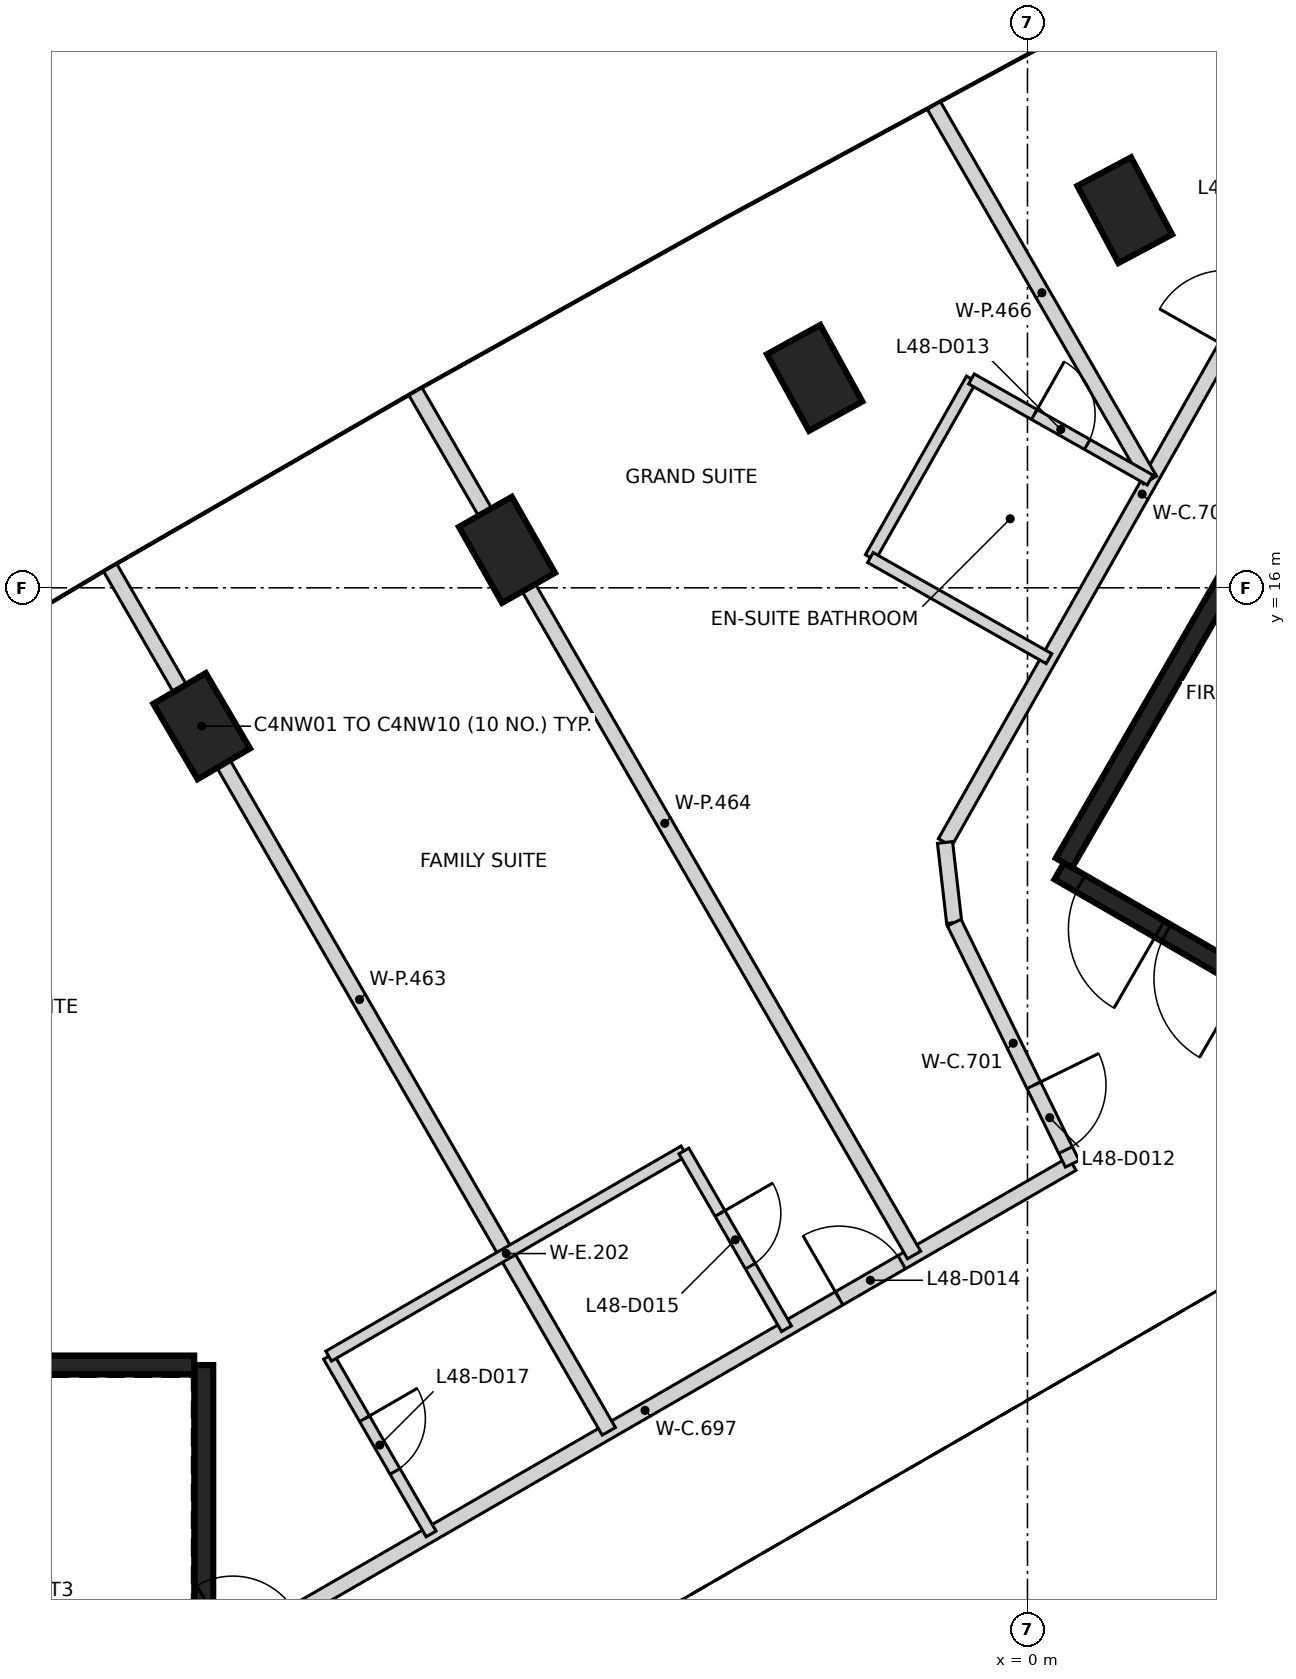
"""IFC4 building model, lengths in metres.
Left out: names, types, materials, properties, quantities, classifications, styles, units other than length and angle.
Written with IfcOpenShell. Run it as: python <this file> out.ifc"""

import sys

from ifc_helpers import new_model, si_unit, direction, frame, frame_2d, origin, origin_2d, place, context, subcontext, project, spatial, rectangle, extrude, element, fill, save


model = new_model("IFC4")
c1 = context("Model", 3, precision=1e-05, world=origin(), true_north=direction((0.0, 1.0)))
c2 = subcontext(c1, "Body", "Model", "MODEL_VIEW")
j1 = project(units=[si_unit("LENGTHUNIT", "METRE"), si_unit("PLANEANGLEUNIT", "RADIAN")], contexts=[c1])
p1 = place(None, origin())
s1 = spatial("IfcSite", under=j1, at=p1, CompositionType="ELEMENT")
p2 = place(p1, origin())
s2 = spatial("IfcBuilding", under=s1, at=p2, CompositionType="ELEMENT")
p3 = place(p2, frame((0.0, 0.0, 193.6)))
s3 = spatial("IfcBuildingStorey", under=s2, at=p3, CompositionType="ELEMENT", Elevation=193.6)
for number, where, z_axis, x_axis in (
    (1, (1.279, 20.968, -0.35), (0.0, 0.0, 1.0), (-0.47, 0.883, 0.0)),
    (2, (-2.8, 18.762, -0.35), (0.0, 0.0, 1.0), (-0.482, 0.876, 0.0)),
    (3, (-6.848, 16.499, -0.35), (0.0, 0.0, 1.0), (-0.494, 0.87, 0.0)),
    (4, (-10.864, 14.18, -0.35), (0.0, 0.0, 1.0), (-0.506, 0.862, 0.0)),
):
    element("IfcColumn", number, at=place(p3, frame(where, z_axis=z_axis, x_axis=x_axis)), inside=s3, PredefinedType="COLUMN", context=c2, shape_type="SweptSolid", body=[
        extrude(rectangle(XDim=1.15, YDim=0.8, at=origin_2d()), origin(), (0.0, 0.0, 1.0), 3.6),
    ])
p4 = place(p3, frame((-10.837, 5.775, 0.0), z_axis=(0.0, 0.0, 1.0), x_axis=(0.0, -1.0, 0.0)))
e5 = element("IfcWall", 5, at=p4, inside=s3, PredefinedType="SHEAR", context=c2, shape_type="SweptSolid", body=[
    extrude(rectangle(XDim=11.55, YDim=0.25, at=frame_2d((5.775, 0.0))), origin(), (0.0, 0.0, 1.0), 3.25),
])
p5 = place(p4, frame((10.025, 0.0, 0.0)))
e6 = element("IfcOpeningElement", 6, at=p5, cuts=e5, PredefinedType="OPENING", context=c2, shape_type="SweptSolid", body=[
    extrude(rectangle(XDim=1.2, YDim=2.1, at=frame_2d((0.6, 1.05))), frame((0.0, 0.135, 0.0), z_axis=(0.0, -1.0, 0.0), x_axis=(1.0, 0.0, 0.0)), (0.0, 0.0, 1.0), 0.27),
])
p6 = place(p4, frame((8.725, 0.0, 0.0)))
e7 = element("IfcOpeningElement", 7, at=p6, cuts=e5, PredefinedType="OPENING", context=c2, shape_type="SweptSolid", body=[
    extrude(rectangle(XDim=1.2, YDim=2.1, at=frame_2d((0.6, 1.05))), frame((0.0, 0.135, 0.0), z_axis=(0.0, -1.0, 0.0), x_axis=(1.0, 0.0, 0.0)), (0.0, 0.0, 1.0), 0.27),
])
p7 = place(p3, frame((-16.472, 5.775, 0.0), z_axis=(0.0, 0.0, 1.0), x_axis=(1.0, 0.0, 0.0)))
e8 = element("IfcWall", 8, at=p7, inside=s3, PredefinedType="SHEAR", context=c2, shape_type="SweptSolid", body=[
    extrude(rectangle(XDim=5.51, YDim=0.25, at=frame_2d((2.755, 0.0))), origin(), (0.0, 0.0, 1.0), 3.25),
])
p8 = place(p3, frame((10.42, 6.498, 0.0), z_axis=(0.0, 0.0, 1.0), x_axis=(-0.866021906294, 0.500006057782, 0.0)))
e9 = element("IfcWall", 9, at=p8, inside=s3, PredefinedType="SHEAR", context=c2, shape_type="SweptSolid", body=[
    extrude(rectangle(XDim=11.55, YDim=0.25, at=frame_2d((5.775, 0.0))), origin(), (0.0, 0.0, 1.0), 3.25),
])
p9 = place(p8, frame((10.025, 0.0, 0.0)))
e10 = element("IfcOpeningElement", 10, at=p9, cuts=e9, PredefinedType="OPENING", context=c2, shape_type="SweptSolid", body=[
    extrude(rectangle(XDim=1.2, YDim=2.1, at=frame_2d((0.6, 1.05))), frame((0.0, 0.135, 0.0), z_axis=(0.0, -1.0, 0.0), x_axis=(1.0, 0.0, 0.0)), (0.0, 0.0, 1.0), 0.27),
])
p10 = place(p8, frame((8.725, 0.0, 0.0)))
e11 = element("IfcOpeningElement", 11, at=p10, cuts=e9, PredefinedType="OPENING", context=c2, shape_type="SweptSolid", body=[
    extrude(rectangle(XDim=1.2, YDim=2.1, at=frame_2d((0.6, 1.05))), frame((0.0, 0.135, 0.0), z_axis=(0.0, -1.0, 0.0), x_axis=(1.0, 0.0, 0.0)), (0.0, 0.0, 1.0), 0.27),
])
p11 = place(p3, frame((0.48, 12.381, 0.0), z_axis=(0.0, 0.0, 1.0), x_axis=(0.49999885962, 0.866026062182, 0.0)))
e12 = element("IfcWall", 12, at=p11, inside=s3, PredefinedType="SHEAR", context=c2, shape_type="SweptSolid", body=[
    extrude(rectangle(XDim=5.225, YDim=0.25, at=frame_2d((2.612, 0.0))), origin(), (0.0, 0.0, 1.0), 3.25),
])
p12 = place(p3, frame((-10.652, 1.934, 0.0), z_axis=(0.0, 0.0, 1.0), x_axis=(0.866066882415, 0.499928150021, 0.0)))
e13 = element("IfcWall", 13, at=p12, inside=s3, PredefinedType="PARTITIONING", context=c2, shape_type="SweptSolid", body=[
    extrude(rectangle(XDim=12.98, YDim=0.2, at=frame_2d((6.49, 0.0))), origin(), (0.0, 0.0, 1.0), 3.25),
])
p13 = place(p12, frame((9.439, 0.0, 0.0)))
e14 = element("IfcOpeningElement", 14, at=p13, cuts=e13, PredefinedType="OPENING", context=c2, shape_type="SweptSolid", body=[
    extrude(rectangle(XDim=0.95, YDim=2.1, at=frame_2d((0.475, 1.05))), frame((0.0, 0.11, 0.0), z_axis=(0.0, -1.0, 0.0), x_axis=(1.0, 0.0, 0.0)), (0.0, 0.0, 1.0), 0.22),
])
p14 = place(p12, frame((0.229, 0.0, 0.0)))
e15 = element("IfcOpeningElement", 15, at=p14, cuts=e13, PredefinedType="OPENING", context=c2, shape_type="SweptSolid", body=[
    extrude(rectangle(XDim=0.95, YDim=2.1, at=frame_2d((0.475, 1.05))), frame((0.0, 0.11, 0.0), z_axis=(0.0, -1.0, 0.0), x_axis=(1.0, 0.0, 0.0)), (0.0, 0.0, 1.0), 0.22),
])
p15 = place(p3, frame((-1.085, 12.65, 0.0), z_axis=(0.0, 0.0, 1.0), x_axis=(0.49243456751, 0.870349468157, 0.0)))
e16 = element("IfcWall", 16, at=p15, inside=s3, PredefinedType="PARTITIONING", context=c2, shape_type="SweptSolid", body=[
    extrude(rectangle(XDim=10.531, YDim=0.2, at=frame_2d((5.266, 0.0))), origin(), (0.0, 0.0, 1.0), 3.25),
])
p16 = place(p15, frame((7.499, 0.0, 0.0)))
e17 = element("IfcOpeningElement", 17, at=p16, cuts=e16, PredefinedType="OPENING", context=c2, shape_type="SweptSolid", body=[
    extrude(rectangle(XDim=1.0, YDim=2.1, at=frame_2d((0.5, 1.05))), frame((0.0, 0.11, 0.0), z_axis=(0.0, -1.0, 0.0), x_axis=(1.0, 0.0, 0.0)), (0.0, 0.0, 1.0), 0.22),
])
p17 = place(p3, frame((-1.085, 12.65, 0.0), z_axis=(0.0, 0.0, 1.0), x_axis=(0.113812454263, -0.993502252264, 0.0)))
e18 = element("IfcWall", 18, at=p17, inside=s3, PredefinedType="PARTITIONING", context=c2, shape_type="SweptSolid", body=[
    extrude(rectangle(XDim=1.062, YDim=0.2, at=frame_2d((0.531, 0.0))), origin(), (0.0, 0.0, 1.0), 3.25),
])
p18 = place(p3, frame((-0.964, 11.595, 0.0), z_axis=(0.0, 0.0, 1.0), x_axis=(0.439787800928, -0.898101714816, 0.0)))
e19 = element("IfcWall", 19, at=p18, inside=s3, PredefinedType="PARTITIONING", context=c2, shape_type="SweptSolid", body=[
    extrude(rectangle(XDim=3.532, YDim=0.2, at=frame_2d((1.766, 0.0))), origin(), (0.0, 0.0, 1.0), 3.25),
])
p19 = place(p18, frame((2.382, 0.0, 0.0)))
e20 = element("IfcOpeningElement", 20, at=p19, cuts=e19, PredefinedType="OPENING", context=c2, shape_type="SweptSolid", body=[
    extrude(rectangle(XDim=0.95, YDim=2.1, at=frame_2d((0.475, 1.05))), frame((0.0, 0.11, 0.0), z_axis=(0.0, -1.0, 0.0), x_axis=(1.0, 0.0, 0.0)), (0.0, 0.0, 1.0), 0.22),
])
p20 = place(p3, frame((-12.067, 16.263, 0.0), z_axis=(0.0, 0.0, 1.0), x_axis=(0.500016190239, -0.866016056144, 0.0)))
e21 = element("IfcWall", 21, at=p20, inside=s3, PredefinedType="PARTITIONING", context=c2, shape_type="SweptSolid", body=[
    extrude(rectangle(XDim=13.118, YDim=0.2, at=frame_2d((6.559, 0.0))), origin(), (0.0, 0.0, 1.0), 3.25),
])
p21 = place(p3, frame((-8.052, 18.582, 0.0), z_axis=(0.0, 0.0, 1.0), x_axis=(0.500046266189, -0.86599869034, 0.0)))
e22 = element("IfcWall", 22, at=p21, inside=s3, PredefinedType="PARTITIONING", context=c2, shape_type="SweptSolid", body=[
    extrude(rectangle(XDim=13.118, YDim=0.2, at=frame_2d((6.559, 0.0))), origin(), (0.0, 0.0, 1.0), 3.25),
])
p22 = place(p3, frame((-1.232, 22.345, 0.0), z_axis=(0.0, 0.0, 1.0), x_axis=(0.499942901263, -0.866058367246, 0.0)))
e23 = element("IfcWall", 23, at=p22, inside=s3, PredefinedType="PARTITIONING", context=c2, shape_type="SweptSolid", body=[
    extrude(rectangle(XDim=5.688, YDim=0.2, at=frame_2d((2.844, 0.0))), origin(), (0.0, 0.0, 1.0), 2.35),
])
p23 = place(p3, frame((-9.195, 5.889, 0.0), z_axis=(0.0, 0.0, 1.0), x_axis=(0.500129820725, -0.865950438779, 0.0)))
e24 = element("IfcWall", 24, at=p23, inside=s3, PredefinedType="PARTITIONING", context=c2, shape_type="SweptSolid", body=[
    extrude(rectangle(XDim=2.698, YDim=0.15, at=frame_2d((1.349, 0.0))), origin(), (0.0, 0.0, 1.0), 3.25),
])
p24 = place(p23, frame((0.948, 0.0, 0.0)))
e25 = element("IfcOpeningElement", 25, at=p24, cuts=e24, PredefinedType="OPENING", context=c2, shape_type="SweptSolid", body=[
    extrude(rectangle(XDim=0.8, YDim=2.1, at=frame_2d((0.4, 1.05))), frame((0.0, 0.085, 0.0), z_axis=(0.0, -1.0, 0.0), x_axis=(1.0, 0.0, 0.0)), (0.0, 0.0, 1.0), 0.17),
])
p25 = place(p3, frame((-9.194, 5.892, 0.0), z_axis=(0.0, 0.0, 1.0), x_axis=(0.8659934935, 0.500055266161, 0.0)))
e26 = element("IfcWall", 26, at=p25, inside=s3, PredefinedType="PARTITIONING", context=c2, shape_type="SweptSolid", body=[
    extrude(rectangle(XDim=5.397, YDim=0.15, at=frame_2d((2.699, 0.0))), origin(), (0.0, 0.0, 1.0), 3.25),
])
p26 = place(p3, frame((-4.52, 8.591, 0.0), z_axis=(0.0, 0.0, 1.0), x_axis=(0.500048589285, -0.86599734893, 0.0)))
e27 = element("IfcWall", 27, at=p26, inside=s3, PredefinedType="PARTITIONING", context=c2, shape_type="SweptSolid", body=[
    extrude(rectangle(XDim=2.7, YDim=0.15, at=frame_2d((1.35, 0.0))), origin(), (0.0, 0.0, 1.0), 3.25),
])
p27 = place(p26, frame((0.95, 0.0, 0.0)))
e28 = element("IfcOpeningElement", 28, at=p27, cuts=e27, PredefinedType="OPENING", context=c2, shape_type="SweptSolid", body=[
    extrude(rectangle(XDim=0.8, YDim=2.1, at=frame_2d((0.4, 1.05))), frame((0.0, 0.085, 0.0), z_axis=(0.0, -1.0, 0.0), x_axis=(1.0, 0.0, 0.0)), (0.0, 0.0, 1.0), 0.17),
])
p28 = place(p3, frame((-2.067, 16.398, 0.0), z_axis=(0.0, 0.0, 1.0), x_axis=(0.492483230042, 0.870321933613, 0.0)))
e29 = element("IfcWall", 29, at=p28, inside=s3, PredefinedType="PARTITIONING", context=c2, shape_type="SweptSolid", body=[
    extrude(rectangle(XDim=2.7, YDim=0.15, at=frame_2d((1.35, 0.0))), origin(), (0.0, 0.0, 1.0), 3.25),
])
p29 = place(p3, frame((-2.067, 16.398, 0.0), z_axis=(0.0, 0.0, 1.0), x_axis=(0.870300002118, -0.492521985614, 0.0)))
e30 = element("IfcWall", 30, at=p29, inside=s3, PredefinedType="PARTITIONING", context=c2, shape_type="SweptSolid", body=[
    extrude(rectangle(XDim=2.7, YDim=0.15, at=frame_2d((1.35, 0.0))), origin(), (0.0, 0.0, 1.0), 3.25),
])
p30 = place(p3, frame((-0.737, 18.748, 0.0), z_axis=(0.0, 0.0, 1.0), x_axis=(0.870283179633, -0.492551710227, 0.0)))
e31 = element("IfcWall", 31, at=p30, inside=s3, PredefinedType="PARTITIONING", context=c2, shape_type="SweptSolid", body=[
    extrude(rectangle(XDim=2.7, YDim=0.15, at=frame_2d((1.35, 0.0))), origin(), (0.0, 0.0, 1.0), 3.25),
])
p31 = place(p30, frame((0.95, 0.0, 0.0)))
e32 = element("IfcOpeningElement", 32, at=p31, cuts=e31, PredefinedType="OPENING", context=c2, shape_type="SweptSolid", body=[
    extrude(rectangle(XDim=0.8, YDim=2.1, at=frame_2d((0.4, 1.05))), frame((0.0, 0.085, 0.0), z_axis=(0.0, -1.0, 0.0), x_axis=(1.0, 0.0, 0.0)), (0.0, 0.0, 1.0), 0.17),
])
p32 = place(p9, origin())
e33 = element("IfcDoor", 33, at=p32, inside=s3, OperationType="SINGLE_SWING_LEFT", PredefinedType="DOOR", context=c2, shape_type="SweptSolid", body=[
    extrude(rectangle(XDim=1.2, YDim=2.1, at=frame_2d((0.6, 1.05))), frame((0.0, 0.025, 0.0), z_axis=(0.0, -1.0, 0.0), x_axis=(1.0, 0.0, 0.0)), (0.0, 0.0, 1.0), 0.05),
])
fill(e10, e33)
p33 = place(p10, origin())
e34 = element("IfcDoor", 34, at=p33, inside=s3, OperationType="SINGLE_SWING_RIGHT", PredefinedType="DOOR", context=c2, shape_type="SweptSolid", body=[
    extrude(rectangle(XDim=1.2, YDim=2.1, at=frame_2d((0.6, 1.05))), frame((0.0, 0.025, 0.0), z_axis=(0.0, -1.0, 0.0), x_axis=(1.0, 0.0, 0.0)), (0.0, 0.0, 1.0), 0.05),
])
fill(e11, e34)
p34 = place(p19, frame((0.95, 0.0, 0.0), z_axis=(0.0, 0.0, 1.0), x_axis=(-1.0, 0.0, 0.0)))
e35 = element("IfcDoor", 35, at=p34, inside=s3, OperationType="SINGLE_SWING_LEFT", PredefinedType="DOOR", context=c2, shape_type="SweptSolid", body=[
    extrude(rectangle(XDim=0.95, YDim=2.1, at=frame_2d((0.475, 1.05))), frame((0.0, 0.025, 0.0), z_axis=(0.0, -1.0, 0.0), x_axis=(1.0, 0.0, 0.0)), (0.0, 0.0, 1.0), 0.05),
])
fill(e20, e35)
p35 = place(p31, frame((0.8, 0.0, 0.0), z_axis=(0.0, 0.0, 1.0), x_axis=(-1.0, 0.0, 0.0)))
e36 = element("IfcDoor", 36, at=p35, inside=s3, OperationType="SINGLE_SWING_LEFT", PredefinedType="DOOR", context=c2, shape_type="SweptSolid", body=[
    extrude(rectangle(XDim=0.8, YDim=2.1, at=frame_2d((0.4, 1.05))), frame((0.0, 0.025, 0.0), z_axis=(0.0, -1.0, 0.0), x_axis=(1.0, 0.0, 0.0)), (0.0, 0.0, 1.0), 0.05),
])
fill(e32, e36)
p36 = place(p13, origin())
e37 = element("IfcDoor", 37, at=p36, inside=s3, OperationType="SINGLE_SWING_LEFT", PredefinedType="DOOR", context=c2, shape_type="SweptSolid", body=[
    extrude(rectangle(XDim=0.95, YDim=2.1, at=frame_2d((0.475, 1.05))), frame((0.0, 0.025, 0.0), z_axis=(0.0, -1.0, 0.0), x_axis=(1.0, 0.0, 0.0)), (0.0, 0.0, 1.0), 0.05),
])
fill(e14, e37)
p37 = place(p27, frame((0.8, 0.0, 0.0), z_axis=(0.0, 0.0, 1.0), x_axis=(-1.0, 0.0, 0.0)))
e38 = element("IfcDoor", 38, at=p37, inside=s3, OperationType="SINGLE_SWING_LEFT", PredefinedType="DOOR", context=c2, shape_type="SweptSolid", body=[
    extrude(rectangle(XDim=0.8, YDim=2.1, at=frame_2d((0.4, 1.05))), frame((0.0, 0.025, 0.0), z_axis=(0.0, -1.0, 0.0), x_axis=(1.0, 0.0, 0.0)), (0.0, 0.0, 1.0), 0.05),
])
fill(e28, e38)
p38 = place(p24, frame((0.8, 0.0, 0.0), z_axis=(0.0, 0.0, 1.0), x_axis=(-1.0, 0.0, 0.0)))
e39 = element("IfcDoor", 39, at=p38, inside=s3, OperationType="SINGLE_SWING_LEFT", PredefinedType="DOOR", context=c2, shape_type="SweptSolid", body=[
    extrude(rectangle(XDim=0.8, YDim=2.1, at=frame_2d((0.4, 1.05))), frame((0.0, 0.025, 0.0), z_axis=(0.0, -1.0, 0.0), x_axis=(1.0, 0.0, 0.0)), (0.0, 0.0, 1.0), 0.05),
])
fill(e25, e39)
save(model, sys.argv[1])
